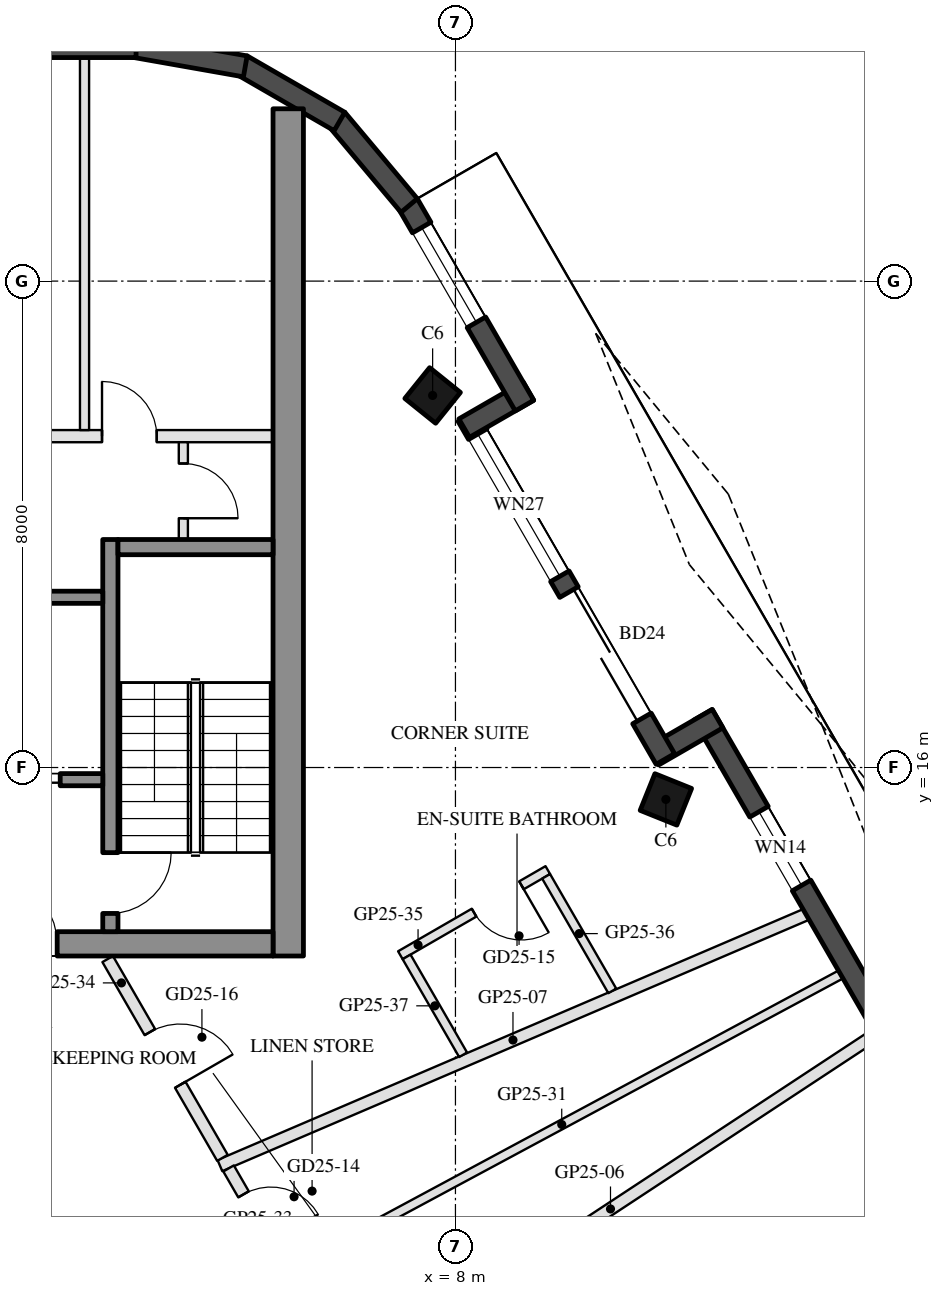
"""IFC4 building model, lengths in metres.
Left out: names, types, materials, properties, quantities, classifications, styles, units other than length and angle.
Written with IfcOpenShell. Run it as: python <this file> out.ifc"""

import sys

from ifc_helpers import new_model, si_unit, direction, frame, frame_2d, origin, origin_2d, place, context, subcontext, project, spatial, rectangle, hollow_rectangle, extrude, boolean, halfspace, element, fill, save


model = new_model("IFC4")
c1 = context("Model", 3, precision=1e-05, world=origin(), true_north=direction((0.0, 1.0)))
c2 = subcontext(c1, "Body", "Model", "MODEL_VIEW")
j1 = project(units=[si_unit("LENGTHUNIT", "METRE"), si_unit("PLANEANGLEUNIT", "RADIAN")], contexts=[c1])
p1 = place(None, origin())
s1 = spatial("IfcSite", under=j1, at=p1, CompositionType="ELEMENT")
p2 = place(p1, origin())
s2 = spatial("IfcBuilding", under=s1, at=p2, CompositionType="ELEMENT")
p3 = place(p2, frame((0.0, 0.0, 265.2)))
s3 = spatial("IfcBuildingStorey", under=s2, at=p3, CompositionType="ELEMENT", Elevation=265.2)
p4 = place(p3, frame((15.296, 8.832, 0.0), z_axis=(-0.131164091109, -0.075789494713, 0.988459373821), x_axis=(-0.500216662939, 0.865900277091, 1.5863597e-05)))
e1 = element("IfcColumn", 1, at=p4, inside=s3, PredefinedType="COLUMN", context=c2, shape_type="SweptSolid", body=[
    boolean("DIFFERENCE", boolean("DIFFERENCE", extrude(hollow_rectangle(XDim=0.65, YDim=0.65, WallThickness=0.03, at=origin_2d()), origin(), (0.0, 0.0, 1.0), 3.743), halfspace(frame((0.0, 0.0, 0.037), z_axis=(0.0, 0.0, 1.0), x_axis=(1.0, 0.0, 0.0)), True)), halfspace(frame((0.0, 0.0, 3.706), z_axis=(0.0, 0.0, 1.0), x_axis=(1.0, 0.0, 0.0)), False)),
])
p5 = place(p3, frame((11.461, 15.475, 0.0), z_axis=(-0.100582464937, -0.128315882454, 0.986619583252), x_axis=(-0.502859866582, 0.862221844537, 0.060872369628)))
e2 = element("IfcColumn", 2, at=p5, inside=s3, PredefinedType="COLUMN", context=c2, shape_type="SweptSolid", body=[
    boolean("DIFFERENCE", boolean("DIFFERENCE", extrude(hollow_rectangle(XDim=0.65, YDim=0.65, WallThickness=0.03, at=origin_2d()), origin(), (0.0, 0.0, 1.0), 3.75), halfspace(frame((0.0, 0.0, 0.04), z_axis=(0.0, 0.0, 1.0), x_axis=(1.0, 0.0, 0.0)), True)), halfspace(frame((0.0, 0.0, 3.71), z_axis=(0.0, 0.0, 1.0), x_axis=(1.0, 0.0, 0.0)), False)),
])
p6 = place(p3, frame((7.625, 22.119, 0.0), z_axis=(-0.069728397733, -0.180050765176, 0.981182792608), x_axis=(-0.504246941598, 0.855030910201, 0.121066776982)))
e3 = element("IfcColumn", 3, at=p6, inside=s3, PredefinedType="COLUMN", context=c2, shape_type="SweptSolid", body=[
    boolean("DIFFERENCE", boolean("DIFFERENCE", extrude(hollow_rectangle(XDim=0.65, YDim=0.65, WallThickness=0.03, at=origin_2d()), origin(), (0.0, 0.0, 1.0), 3.771), halfspace(frame((0.0, 0.0, 0.047), z_axis=(0.0, 0.0, 1.0), x_axis=(1.0, 0.0, 0.0)), True)), halfspace(frame((0.0, 0.0, 3.724), z_axis=(0.0, 0.0, 1.0), x_axis=(1.0, 0.0, 0.0)), False)),
])
p7 = place(p3, frame((16.807, 8.665, 0.0), z_axis=(0.0, 0.0, 1.0), x_axis=(-0.499992427901, 0.866029775494, 0.0)))
e4 = element("IfcWall", 4, at=p7, inside=s3, PredefinedType="SOLIDWALL", context=c2, shape_type="SweptSolid", body=[
    extrude(rectangle(XDim=9.472, YDim=0.35, at=frame_2d((4.736, 0.0))), origin(), (0.0, 0.0, 1.0), 3.55),
])
p8 = place(p7, frame((1.615, 0.0, 0.0)))
e5 = element("IfcOpeningElement", 5, at=p8, cuts=e4, PredefinedType="OPENING", context=c2, shape_type="SweptSolid", body=[
    extrude(rectangle(XDim=1.4, YDim=2.4, at=frame_2d((0.7, 1.2))), frame((0.0, 0.185, 0.0), z_axis=(0.0, -1.0, 0.0), x_axis=(1.0, 0.0, 0.0)), (0.0, 0.0, 1.0), 0.37),
])
p9 = place(p7, frame((6.23, 0.0, 0.3)))
e6 = element("IfcOpeningElement", 6, at=p9, cuts=e4, PredefinedType="OPENING", context=c2, shape_type="SweptSolid", body=[
    extrude(rectangle(XDim=1.4, YDim=2.65, at=frame_2d((0.7, 1.325))), frame((0.0, 0.185, 0.0), z_axis=(0.0, -1.0, 0.0), x_axis=(1.0, 0.0, 0.0)), (0.0, 0.0, 1.0), 0.37),
])
p10 = place(p3, frame((12.311, 16.803, 0.0), z_axis=(0.0, 0.0, 1.0), x_axis=(-0.866005645448, -0.500034220881, 0.0)))
e7 = element("IfcWall", 7, at=p10, inside=s3, PredefinedType="SOLIDWALL", context=c2, shape_type="SweptSolid", body=[
    extrude(rectangle(XDim=1.22, YDim=0.35, at=frame_2d((0.61, 0.0))), origin(), (0.0, 0.0, 1.0), 3.55),
])
p11 = place(p3, frame((11.452, 16.14, 0.0), z_axis=(0.0, 0.0, 1.0), x_axis=(-0.49998210071, 0.866035737698, 0.0)))
e8 = element("IfcWall", 8, at=p11, inside=s3, PredefinedType="SOLIDWALL", context=c2, shape_type="SweptSolid", body=[
    extrude(rectangle(XDim=6.511, YDim=0.35, at=frame_2d((3.256, 0.0))), origin(), (0.0, 0.0, 1.0), 3.55),
])
p12 = place(p11, frame((0.77, 0.0, 0.0)))
e9 = element("IfcOpeningElement", 9, at=p12, cuts=e8, PredefinedType="OPENING", context=c2, shape_type="SweptSolid", body=[
    extrude(rectangle(XDim=2.4, YDim=2.4, at=frame_2d((1.2, 1.2))), frame((0.0, 0.185, 0.0), z_axis=(0.0, -1.0, 0.0), x_axis=(1.0, 0.0, 0.0)), (0.0, 0.0, 1.0), 0.37),
])
p13 = place(p11, frame((3.47, 0.0, 0.3)))
e10 = element("IfcOpeningElement", 10, at=p13, cuts=e8, PredefinedType="OPENING", context=c2, shape_type="SweptSolid", body=[
    extrude(rectangle(XDim=2.7, YDim=2.65, at=frame_2d((1.35, 1.325))), frame((0.0, 0.185, 0.0), z_axis=(0.0, -1.0, 0.0), x_axis=(1.0, 0.0, 0.0)), (0.0, 0.0, 1.0), 0.37),
])
p14 = place(p3, frame((8.143, 21.582, 0.0), z_axis=(0.0, 0.0, 1.0), x_axis=(0.866092288191, 0.499884134912, 0.0)))
e11 = element("IfcWall", 11, at=p14, inside=s3, PredefinedType="SOLIDWALL", context=c2, shape_type="SweptSolid", body=[
    extrude(rectangle(XDim=1.22, YDim=0.35, at=frame_2d((0.61, 0.0))), origin(), (0.0, 0.0, 1.0), 3.55),
])
p15 = place(p3, frame((9.135, 21.952, 0.0), z_axis=(0.0, 0.0, 1.0), x_axis=(-0.499972675833, 0.866041178825, 0.0)))
e12 = element("IfcWall", 12, at=p15, inside=s3, PredefinedType="SOLIDWALL", context=c2, shape_type="SweptSolid", body=[
    extrude(rectangle(XDim=3.829, YDim=0.35, at=frame_2d((1.915, 0.0))), origin(), (0.0, 0.0, 1.0), 3.55),
])
p16 = place(p15, frame((1.582, 0.0, 0.3)))
e13 = element("IfcOpeningElement", 13, at=p16, cuts=e12, PredefinedType="OPENING", context=c2, shape_type="SweptSolid", body=[
    extrude(rectangle(XDim=1.8, YDim=2.65, at=frame_2d((0.9, 1.325))), frame((0.0, 0.185, 0.0), z_axis=(0.0, -1.0, 0.0), x_axis=(1.0, 0.0, 0.0)), (0.0, 0.0, 1.0), 0.37),
])
p17 = place(p3, frame((7.239, 25.243, 0.0), z_axis=(0.0, 0.0, 1.0), x_axis=(-0.642756798522, 0.7660702957, 0.0)))
e14 = element("IfcWall", 14, at=p17, inside=s3, PredefinedType="SOLIDWALL", context=c2, shape_type="SweptSolid", body=[
    extrude(rectangle(XDim=1.855, YDim=0.35, at=frame_2d((0.928, 0.0))), origin(), (0.0, 0.0, 1.0), 3.55),
])
p18 = place(p3, frame((6.093, 26.625, 0.0), z_axis=(0.0, 0.0, 1.0), x_axis=(-0.866080385203, 0.499904757295, 0.0)))
e15 = element("IfcWall", 15, at=p18, inside=s3, PredefinedType="SOLIDWALL", context=c2, shape_type="SweptSolid", body=[
    extrude(rectangle(XDim=1.855, YDim=0.35, at=frame_2d((0.927, 0.0))), origin(), (0.0, 0.0, 1.0), 3.55),
])
p19 = place(p3, frame((4.544, 27.532, 0.0), z_axis=(0.0, 0.0, 1.0), x_axis=(-0.984795480386, 0.173717764815, 0.0)))
e16 = element("IfcWall", 16, at=p19, inside=s3, PredefinedType="SOLIDWALL", context=c2, shape_type="SweptSolid", body=[
    extrude(rectangle(XDim=1.855, YDim=0.35, at=frame_2d((0.928, 0.0))), origin(), (0.0, 0.0, 1.0), 3.55),
])
p20 = place(p3, frame((2.747, 27.851, 0.0), z_axis=(0.0, 0.0, 1.0), x_axis=(-1.0, 0.0, 0.0)))
e17 = element("IfcWall", 17, at=p20, inside=s3, PredefinedType="SOLIDWALL", context=c2, shape_type="SweptSolid", body=[
    extrude(rectangle(XDim=5.495, YDim=0.35, at=frame_2d((2.747, 0.0))), origin(), (0.0, 0.0, 1.0), 3.55),
])
p21 = place(p3, frame((5.25, 12.9, 0.0), z_axis=(0.0, 0.0, 1.0), x_axis=(0.0, 1.0, 0.0)))
e18 = element("IfcWall", 18, at=p21, inside=s3, PredefinedType="SHEAR", context=c2, shape_type="SweptSolid", body=[
    extrude(rectangle(XDim=13.934, YDim=0.5, at=frame_2d((6.967, 0.0))), origin(), (0.0, 0.0, 1.0), 3.5),
])
p22 = place(p3, frame((5.0, 13.1, 0.0), z_axis=(0.0, 0.0, 1.0), x_axis=(-1.0, 0.0, 0.0)))
e19 = element("IfcWall", 19, at=p22, inside=s3, PredefinedType="SHEAR", context=c2, shape_type="SweptSolid", body=[
    extrude(rectangle(XDim=10.0, YDim=0.4, at=frame_2d((5.0, 0.0))), origin(), (0.0, 0.0, 1.0), 3.5),
])
p23 = place(p22, frame((3.55, 0.0, 0.0)))
e20 = element("IfcOpeningElement", 20, at=p23, cuts=e19, PredefinedType="OPENING", context=c2, shape_type="SweptSolid", body=[
    extrude(rectangle(XDim=1.1, YDim=2.1, at=frame_2d((0.55, 1.05))), frame((0.0, 0.21, 0.0), z_axis=(0.0, -1.0, 0.0), x_axis=(1.0, 0.0, 0.0)), (0.0, 0.0, 1.0), 0.42),
])
p24 = place(p22, frame((5.85, 0.0, 0.0)))
e21 = element("IfcOpeningElement", 21, at=p24, cuts=e19, PredefinedType="OPENING", context=c2, shape_type="SweptSolid", body=[
    extrude(rectangle(XDim=1.4, YDim=2.1, at=frame_2d((0.7, 1.05))), frame((0.0, 0.21, 0.0), z_axis=(0.0, -1.0, 0.0), x_axis=(1.0, 0.0, 0.0)), (0.0, 0.0, 1.0), 0.42),
])
p25 = place(p3, frame((2.325, 13.3, 0.0), z_axis=(0.0, 0.0, 1.0), x_axis=(0.0, 1.0, 0.0)))
e22 = element("IfcWall", 22, at=p25, inside=s3, PredefinedType="SHEAR", context=c2, shape_type="SweptSolid", body=[
    extrude(rectangle(XDim=6.45, YDim=0.25, at=frame_2d((3.225, 0.0))), origin(), (0.0, 0.0, 1.0), 3.5),
])
p26 = place(p25, frame((0.3, 0.0, 0.0)))
e23 = element("IfcOpeningElement", 23, at=p26, cuts=e22, PredefinedType="OPENING", context=c2, shape_type="SweptSolid", body=[
    extrude(rectangle(XDim=1.0, YDim=2.1, at=frame_2d((0.5, 1.05))), frame((0.0, 0.135, 0.0), z_axis=(0.0, -1.0, 0.0), x_axis=(1.0, 0.0, 0.0)), (0.0, 0.0, 1.0), 0.27),
])
p27 = place(p3, frame((5.0, 19.625, 0.0), z_axis=(0.0, 0.0, 1.0), x_axis=(-1.0, 0.0, 0.0)))
e24 = element("IfcWall", 24, at=p27, inside=s3, PredefinedType="SHEAR", context=c2, shape_type="SweptSolid", body=[
    extrude(rectangle(XDim=2.55, YDim=0.25, at=frame_2d((1.275, 0.0))), origin(), (0.0, 0.0, 1.0), 3.5),
])
p28 = place(p3, frame((2.2, 18.8, 0.0), z_axis=(0.0, 0.0, 1.0), x_axis=(-1.0, 0.0, 0.0)))
e25 = element("IfcWall", 25, at=p28, inside=s3, PredefinedType="SHEAR", context=c2, shape_type="SweptSolid", body=[
    extrude(rectangle(XDim=2.8, YDim=0.2, at=frame_2d((1.4, 0.0))), origin(), (0.0, 0.0, 1.0), 3.5),
])
p29 = place(p3, frame((2.2, 15.8, 0.0), z_axis=(0.0, 0.0, 1.0), x_axis=(-1.0, 0.0, 0.0)))
e26 = element("IfcWall", 26, at=p29, inside=s3, PredefinedType="SHEAR", context=c2, shape_type="SweptSolid", body=[
    extrude(rectangle(XDim=2.8, YDim=0.2, at=frame_2d((1.4, 0.0))), origin(), (0.0, 0.0, 1.0), 3.5),
])
p30 = place(p29, frame((0.7, 0.0, 0.0)))
e27 = element("IfcOpeningElement", 27, at=p30, cuts=e26, PredefinedType="OPENING", context=c2, shape_type="SweptSolid", body=[
    extrude(rectangle(XDim=1.2, YDim=2.1, at=frame_2d((0.6, 1.05))), frame((0.0, 0.11, 0.0), z_axis=(0.0, -1.0, 0.0), x_axis=(1.0, 0.0, 0.0)), (0.0, 0.0, 1.0), 0.22),
])
p31 = place(p3, frame((5.0, 21.45, 0.0), z_axis=(0.0, 0.0, 1.0), x_axis=(-1.0, 0.0, 0.0)))
e28 = element("IfcWall", 28, at=p31, inside=s3, PredefinedType="PARTITIONING", context=c2, shape_type="SweptSolid", body=[
    extrude(rectangle(XDim=5.4, YDim=0.2, at=frame_2d((2.7, 0.0))), origin(), (0.0, 0.0, 1.0), 3.5),
])
p32 = place(p31, frame((1.913, 0.0, 0.0)))
e29 = element("IfcOpeningElement", 29, at=p32, cuts=e28, PredefinedType="OPENING", context=c2, shape_type="SweptSolid", body=[
    extrude(rectangle(XDim=0.9, YDim=2.1, at=frame_2d((0.45, 1.05))), frame((0.0, 0.11, 0.0), z_axis=(0.0, -1.0, 0.0), x_axis=(1.0, 0.0, 0.0)), (0.0, 0.0, 1.0), 0.22),
])
p33 = place(p31, frame((3.788, 0.0, 0.0)))
e30 = element("IfcOpeningElement", 30, at=p33, cuts=e28, PredefinedType="OPENING", context=c2, shape_type="SweptSolid", body=[
    extrude(rectangle(XDim=0.9, YDim=2.1, at=frame_2d((0.45, 1.05))), frame((0.0, 0.11, 0.0), z_axis=(0.0, -1.0, 0.0), x_axis=(1.0, 0.0, 0.0)), (0.0, 0.0, 1.0), 0.22),
])
p34 = place(p3, frame((3.525, 19.75, 0.0), z_axis=(0.0, 0.0, 1.0), x_axis=(0.0, 1.0, 0.0)))
e31 = element("IfcWall", 31, at=p34, inside=s3, PredefinedType="PARTITIONING", context=c2, shape_type="SweptSolid", body=[
    extrude(rectangle(XDim=1.6, YDim=0.15, at=frame_2d((0.8, 0.0))), origin(), (0.0, 0.0, 1.0), 3.5),
])
p35 = place(p34, frame((0.35, 0.0, 0.0)))
e32 = element("IfcOpeningElement", 32, at=p35, cuts=e31, PredefinedType="OPENING", context=c2, shape_type="SweptSolid", body=[
    extrude(rectangle(XDim=0.9, YDim=2.1, at=frame_2d((0.45, 1.05))), frame((0.0, 0.085, 0.0), z_axis=(0.0, -1.0, 0.0), x_axis=(1.0, 0.0, 0.0)), (0.0, 0.0, 1.0), 0.17),
])
p36 = place(p3, frame((1.9, 21.55, 0.0), z_axis=(0.0, 0.0, 1.0), x_axis=(0.0, 1.0, 0.0)))
e33 = element("IfcWall", 33, at=p36, inside=s3, PredefinedType="PARTITIONING", context=c2, shape_type="SweptSolid", body=[
    extrude(rectangle(XDim=6.126, YDim=0.15, at=frame_2d((3.063, 0.0))), origin(), (0.0, 0.0, 1.0), 3.5),
])
p37 = place(p3, frame((14.906, 11.608, 0.0), z_axis=(0.0, 0.0, 1.0), x_axis=(-0.835212554653, -0.549927257507, 0.0)))
e34 = element("IfcWall", 34, at=p37, inside=s3, PredefinedType="PARTITIONING", context=c2, shape_type="SweptSolid", body=[
    extrude(rectangle(XDim=10.431, YDim=0.2, at=frame_2d((5.216, 0.0))), origin(), (0.0, 0.0, 1.0), 3.1),
])
p38 = place(p3, frame((13.766, 13.583, 0.0), z_axis=(0.0, 0.0, 1.0), x_axis=(-0.919210042537, -0.393767568115, 0.0)))
e35 = element("IfcWall", 35, at=p38, inside=s3, PredefinedType="PARTITIONING", context=c2, shape_type="SweptSolid", body=[
    extrude(rectangle(XDim=10.487, YDim=0.2, at=frame_2d((5.243, 0.0))), origin(), (0.0, 0.0, 1.0), 3.1),
])
p39 = place(p3, frame((14.336, 12.595, 0.0), z_axis=(0.0, 0.0, 1.0), x_axis=(-0.880794466183, -0.473498794445, 0.0)))
e36 = element("IfcWall", 36, at=p39, inside=s3, PredefinedType="PARTITIONING", context=c2, shape_type="SweptSolid", body=[
    extrude(rectangle(XDim=10.418, YDim=0.15, at=frame_2d((5.209, 0.0))), origin(), (0.0, 0.0, 1.0), 3.0),
])
p40 = place(p3, frame((4.269, 9.406, 0.0), z_axis=(0.0, 0.0, 1.0), x_axis=(0.499973055223, -0.8660409598, 0.0)))
e37 = element("IfcWall", 37, at=p40, inside=s3, PredefinedType="PARTITIONING", context=c2, shape_type="SweptSolid", body=[
    extrude(rectangle(XDim=1.883, YDim=0.2, at=frame_2d((0.942, 0.0))), origin(), (0.0, 0.0, 1.0), 3.55),
])
p41 = place(p40, frame((0.492, 0.0, 0.0)))
e38 = element("IfcOpeningElement", 38, at=p41, cuts=e37, PredefinedType="OPENING", context=c2, shape_type="SweptSolid", body=[
    extrude(rectangle(XDim=0.9, YDim=2.1, at=frame_2d((0.45, 1.05))), frame((0.0, 0.11, 0.0), z_axis=(0.0, -1.0, 0.0), x_axis=(1.0, 0.0, 0.0)), (0.0, 0.0, 1.0), 0.22),
])
p42 = place(p3, frame((2.281, 12.85, 0.0), z_axis=(0.0, 0.0, 1.0), x_axis=(0.499978071388, -0.866038063904, 0.0)))
e39 = element("IfcWall", 39, at=p42, inside=s3, PredefinedType="PARTITIONING", context=c2, shape_type="SweptSolid", body=[
    extrude(rectangle(XDim=3.776, YDim=0.2, at=frame_2d((1.888, 0.0))), origin(), (0.0, 0.0, 1.0), 3.0),
])
p43 = place(p42, frame((1.388, 0.0, 0.0)))
e40 = element("IfcOpeningElement", 40, at=p43, cuts=e39, PredefinedType="OPENING", context=c2, shape_type="SweptSolid", body=[
    extrude(rectangle(XDim=1.0, YDim=2.1, at=frame_2d((0.5, 1.05))), frame((0.0, 0.11, 0.0), z_axis=(0.0, -1.0, 0.0), x_axis=(1.0, 0.0, 0.0)), (0.0, 0.0, 1.0), 0.22),
])
p44 = place(p3, frame((9.519, 14.313, 0.0), z_axis=(0.0, 0.0, 1.0), x_axis=(-0.865996816683, -0.500049511043, 0.0)))
e41 = element("IfcWall", 41, at=p44, inside=s3, PredefinedType="PARTITIONING", context=c2, shape_type="SweptSolid", body=[
    extrude(rectangle(XDim=2.8, YDim=0.15, at=frame_2d((1.4, 0.0))), origin(), (0.0, 0.0, 1.0), 3.55),
])
p45 = place(p44, frame((0.5, 0.0, 0.0)))
e42 = element("IfcOpeningElement", 42, at=p45, cuts=e41, PredefinedType="OPENING", context=c2, shape_type="SweptSolid", body=[
    extrude(rectangle(XDim=0.9, YDim=2.1, at=frame_2d((0.45, 1.05))), frame((0.0, 0.085, 0.0), z_axis=(0.0, -1.0, 0.0), x_axis=(1.0, 0.0, 0.0)), (0.0, 0.0, 1.0), 0.17),
])
p46 = place(p3, frame((10.579, 12.326, 0.0), z_axis=(0.0, 0.0, 1.0), x_axis=(-0.499965319569, 0.866045425615, 0.0)))
e43 = element("IfcWall", 43, at=p46, inside=s3, PredefinedType="PARTITIONING", context=c2, shape_type="SweptSolid", body=[
    extrude(rectangle(XDim=2.176, YDim=0.15, at=frame_2d((1.088, 0.0))), origin(), (0.0, 0.0, 1.0), 3.0),
])
p47 = place(p3, frame((8.126, 11.276, 0.0), z_axis=(0.0, 0.0, 1.0), x_axis=(-0.500093796661, 0.865971243484, 0.0)))
e44 = element("IfcWall", 44, at=p47, inside=s3, PredefinedType="PARTITIONING", context=c2, shape_type="SweptSolid", body=[
    extrude(rectangle(XDim=1.859, YDim=0.15, at=frame_2d((0.93, 0.0))), origin(), (0.0, 0.0, 1.0), 3.0),
])
p48 = place(p9, origin())
e45 = element("IfcWindow", 45, at=p48, inside=s3, PartitioningType="SINGLE_PANEL", PredefinedType="WINDOW", context=c2, shape_type="SweptSolid", body=[
    extrude(rectangle(XDim=1.4, YDim=2.65, at=frame_2d((0.7, 1.325))), frame((0.0, 0.03, 0.0), z_axis=(0.0, -1.0, 0.0), x_axis=(1.0, 0.0, 0.0)), (0.0, 0.0, 1.0), 0.06),
])
fill(e6, e45)
p49 = place(p12, frame((2.4, 0.0, 0.0), z_axis=(0.0, 0.0, 1.0), x_axis=(-1.0, 0.0, 0.0)))
e46 = element("IfcDoor", 46, at=p49, inside=s3, OperationType="SLIDING_TO_LEFT", PredefinedType="DOOR", context=c2, shape_type="SweptSolid", body=[
    extrude(rectangle(XDim=2.4, YDim=2.4, at=frame_2d((1.2, 1.2))), frame((0.0, 0.025, 0.0), z_axis=(0.0, -1.0, 0.0), x_axis=(1.0, 0.0, 0.0)), (0.0, 0.0, 1.0), 0.05),
])
fill(e9, e46)
p50 = place(p13, origin())
e47 = element("IfcWindow", 47, at=p50, inside=s3, PartitioningType="SINGLE_PANEL", PredefinedType="WINDOW", context=c2, shape_type="SweptSolid", body=[
    extrude(rectangle(XDim=2.7, YDim=2.65, at=frame_2d((1.35, 1.325))), frame((0.0, 0.03, 0.0), z_axis=(0.0, -1.0, 0.0), x_axis=(1.0, 0.0, 0.0)), (0.0, 0.0, 1.0), 0.06),
])
fill(e10, e47)
p51 = place(p16, origin())
e48 = element("IfcWindow", 48, at=p51, inside=s3, PartitioningType="SINGLE_PANEL", PredefinedType="WINDOW", context=c2, shape_type="SweptSolid", body=[
    extrude(rectangle(XDim=1.8, YDim=2.65, at=frame_2d((0.9, 1.325))), frame((0.0, 0.03, 0.0), z_axis=(0.0, -1.0, 0.0), x_axis=(1.0, 0.0, 0.0)), (0.0, 0.0, 1.0), 0.06),
])
fill(e13, e48)
p52 = place(p30, origin())
e49 = element("IfcDoor", 49, at=p52, inside=s3, OperationType="DOUBLE_DOOR_SLIDING", PredefinedType="DOOR", context=c2, shape_type="SweptSolid", body=[
    extrude(rectangle(XDim=1.2, YDim=2.1, at=frame_2d((0.6, 1.05))), frame((0.0, 0.025, 0.0), z_axis=(0.0, -1.0, 0.0), x_axis=(1.0, 0.0, 0.0)), (0.0, 0.0, 1.0), 0.05),
])
fill(e27, e49)
p53 = place(p35, frame((0.9, 0.0, 0.0), z_axis=(0.0, 0.0, 1.0), x_axis=(-1.0, 0.0, 0.0)))
e50 = element("IfcDoor", 50, at=p53, inside=s3, OperationType="SINGLE_SWING_RIGHT", PredefinedType="DOOR", context=c2, shape_type="SweptSolid", body=[
    extrude(rectangle(XDim=0.9, YDim=2.1, at=frame_2d((0.45, 1.05))), frame((0.0, 0.025, 0.0), z_axis=(0.0, -1.0, 0.0), x_axis=(1.0, 0.0, 0.0)), (0.0, 0.0, 1.0), 0.05),
])
fill(e32, e50)
p54 = place(p32, frame((0.9, 0.0, 0.0), z_axis=(0.0, 0.0, 1.0), x_axis=(-1.0, 0.0, 0.0)))
e51 = element("IfcDoor", 51, at=p54, inside=s3, OperationType="SINGLE_SWING_LEFT", PredefinedType="DOOR", context=c2, shape_type="SweptSolid", body=[
    extrude(rectangle(XDim=0.9, YDim=2.1, at=frame_2d((0.45, 1.05))), frame((0.0, 0.025, 0.0), z_axis=(0.0, -1.0, 0.0), x_axis=(1.0, 0.0, 0.0)), (0.0, 0.0, 1.0), 0.05),
])
fill(e29, e51)
p55 = place(p23, frame((1.1, 0.0, 0.0), z_axis=(0.0, 0.0, 1.0), x_axis=(-1.0, 0.0, 0.0)))
e52 = element("IfcDoor", 52, at=p55, inside=s3, OperationType="SINGLE_SWING_LEFT", PredefinedType="DOOR", context=c2, shape_type="SweptSolid", body=[
    extrude(rectangle(XDim=1.1, YDim=2.1, at=frame_2d((0.55, 1.05))), frame((0.0, 0.025, 0.0), z_axis=(0.0, -1.0, 0.0), x_axis=(1.0, 0.0, 0.0)), (0.0, 0.0, 1.0), 0.05),
])
fill(e20, e52)
p56 = place(p26, frame((1.0, 0.0, 0.0), z_axis=(0.0, 0.0, 1.0), x_axis=(-1.0, 0.0, 0.0)))
e53 = element("IfcDoor", 53, at=p56, inside=s3, OperationType="SINGLE_SWING_LEFT", PredefinedType="DOOR", context=c2, shape_type="SweptSolid", body=[
    extrude(rectangle(XDim=1.0, YDim=2.1, at=frame_2d((0.5, 1.05))), frame((0.0, 0.025, 0.0), z_axis=(0.0, -1.0, 0.0), x_axis=(1.0, 0.0, 0.0)), (0.0, 0.0, 1.0), 0.05),
])
fill(e23, e53)
p57 = place(p41, origin())
e54 = element("IfcDoor", 54, at=p57, inside=s3, OperationType="SINGLE_SWING_RIGHT", PredefinedType="DOOR", context=c2, shape_type="SweptSolid", body=[
    extrude(rectangle(XDim=0.9, YDim=2.1, at=frame_2d((0.45, 1.05))), frame((0.0, 0.025, 0.0), z_axis=(0.0, -1.0, 0.0), x_axis=(1.0, 0.0, 0.0)), (0.0, 0.0, 1.0), 0.05),
])
fill(e38, e54)
p58 = place(p45, origin())
e55 = element("IfcDoor", 55, at=p58, inside=s3, OperationType="SINGLE_SWING_LEFT", PredefinedType="DOOR", context=c2, shape_type="SweptSolid", body=[
    extrude(rectangle(XDim=0.9, YDim=2.1, at=frame_2d((0.45, 1.05))), frame((0.0, 0.025, 0.0), z_axis=(0.0, -1.0, 0.0), x_axis=(1.0, 0.0, 0.0)), (0.0, 0.0, 1.0), 0.05),
])
fill(e42, e55)
p59 = place(p43, origin())
e56 = element("IfcDoor", 56, at=p59, inside=s3, OperationType="SINGLE_SWING_RIGHT", PredefinedType="DOOR", context=c2, shape_type="SweptSolid", body=[
    extrude(rectangle(XDim=1.0, YDim=2.1, at=frame_2d((0.5, 1.05))), frame((0.0, 0.025, 0.0), z_axis=(0.0, -1.0, 0.0), x_axis=(1.0, 0.0, 0.0)), (0.0, 0.0, 1.0), 0.05),
])
fill(e40, e56)
save(model, sys.argv[1])
